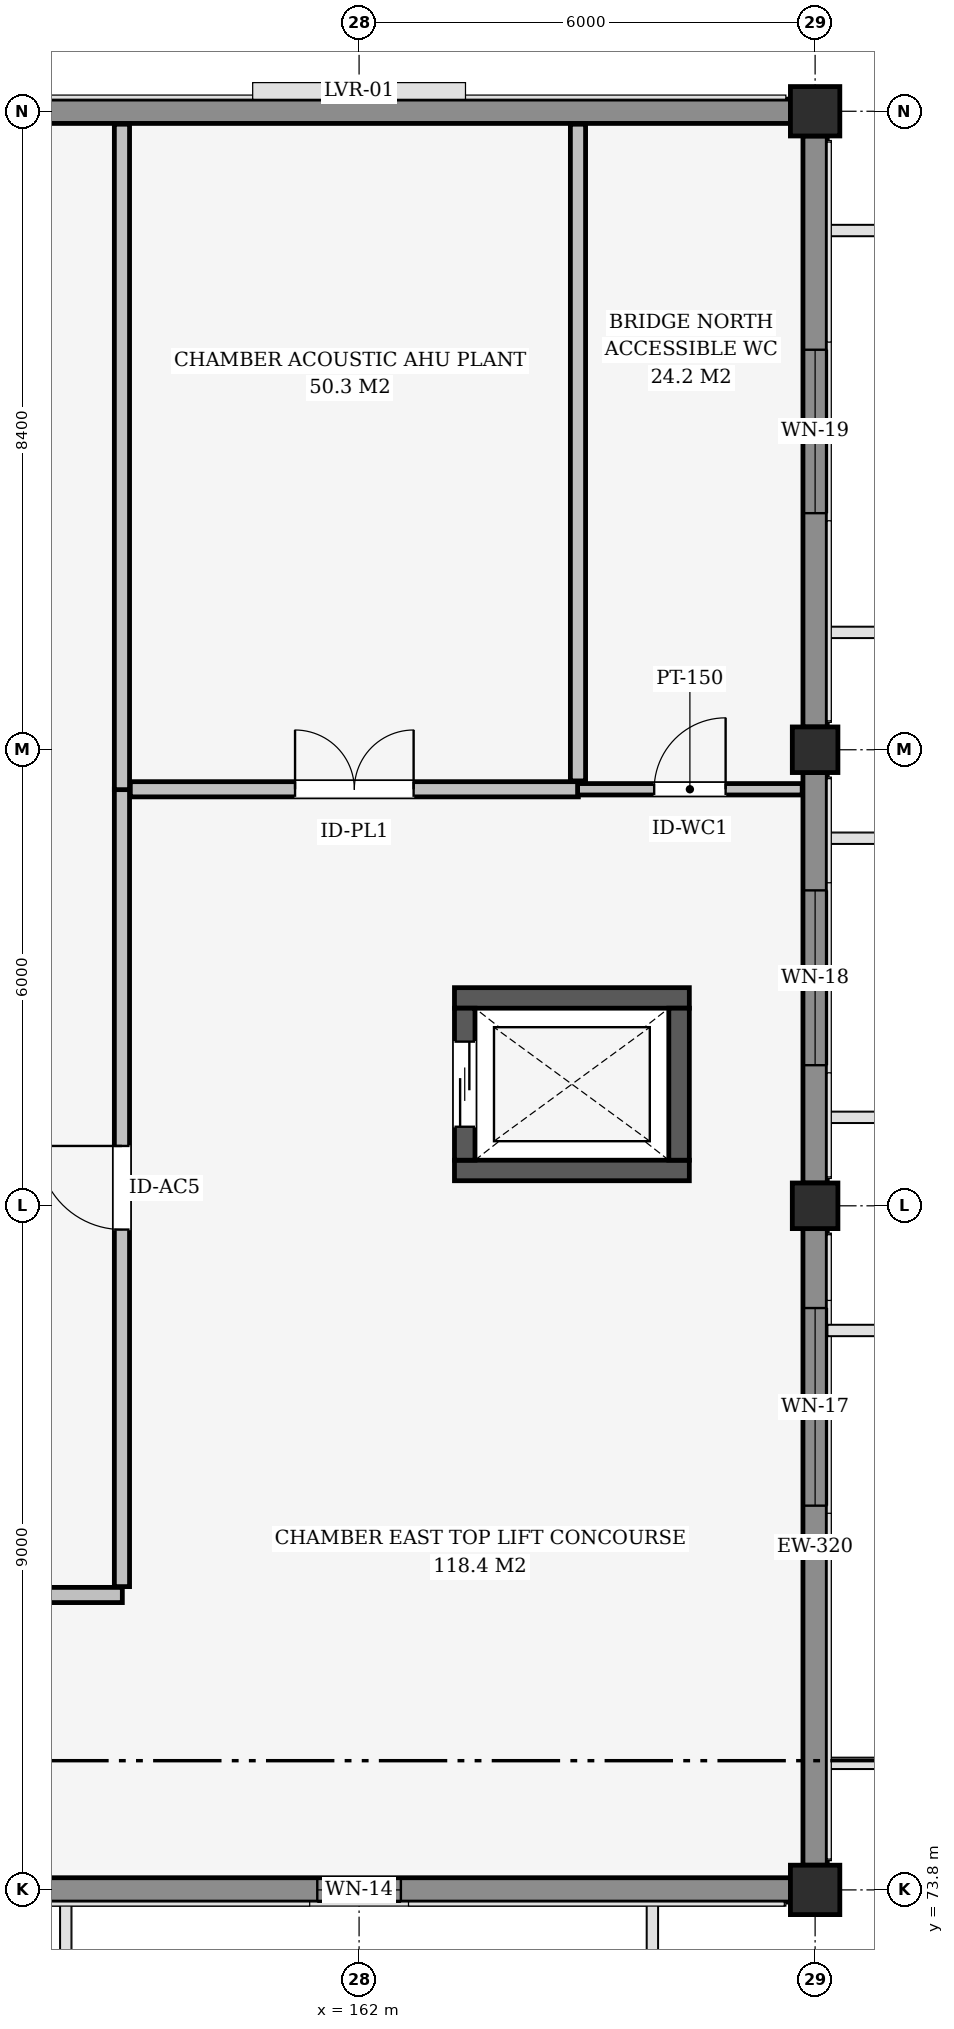
"""IFC4 building model, lengths in metres.
Left out: names, types, materials, properties, quantities, classifications, styles, units other than length and angle.
Written with IfcOpenShell. Run it as: python <this file> out.ifc"""

import sys

from ifc_helpers import new_model, si_unit, direction, frame, frame_2d, origin, origin_2d, place, context, subcontext, project, spatial, rectangle, extrude, element, fill, save


model = new_model("IFC4")
c1 = context("Model", 3, precision=1e-05, world=origin(), true_north=direction((0.0, 1.0)))
c2 = subcontext(c1, "Body", "Model", "MODEL_VIEW")
j1 = project(units=[si_unit("LENGTHUNIT", "METRE"), si_unit("PLANEANGLEUNIT", "RADIAN")], contexts=[c1])
p1 = place(None, origin())
s1 = spatial("IfcSite", under=j1, at=p1, CompositionType="ELEMENT")
p2 = place(p1, origin())
s2 = spatial("IfcBuilding", under=s1, at=p2, CompositionType="ELEMENT")
p3 = place(p2, frame((0.0, 0.0, 13.8)))
s3 = spatial("IfcBuildingStorey", under=s2, at=p3, CompositionType="ELEMENT", Elevation=13.8)
p4 = place(p3, frame((168.0, 73.8, 0.0), z_axis=(0.0, 0.0, 1.0), x_axis=(1.0, 0.0, 0.0)))
e1 = element("IfcColumn", 1, at=p4, inside=s3, PredefinedType="COLUMN", context=c2, shape_type="SweptSolid", body=[
    extrude(rectangle(XDim=0.65, YDim=0.65, at=origin_2d()), origin(), (0.0, 0.0, 1.0), 4.5),
])
for number, where, z_axis, x_axis in (
    (2, (168.0, 82.8, 0.0), (0.0, 0.0, 1.0), (1.0, 0.0, 0.0)),
    (3, (168.0, 88.8, 0.0), (0.0, 0.0, 1.0), (1.0, 0.0, 0.0)),
):
    element("IfcColumn", number, at=place(p3, frame(where, z_axis=z_axis, x_axis=x_axis)), inside=s3, PredefinedType="COLUMN", context=c2, shape_type="SweptSolid", body=[
        extrude(rectangle(XDim=0.6, YDim=0.6, at=origin_2d()), origin(), (0.0, 0.0, 1.0), 4.5),
    ])
p5 = place(p3, frame((168.0, 97.2, 0.0), z_axis=(0.0, 0.0, 1.0), x_axis=(1.0, 0.0, 0.0)))
e4 = element("IfcColumn", 4, at=p5, inside=s3, PredefinedType="COLUMN", context=c2, shape_type="SweptSolid", body=[
    extrude(rectangle(XDim=0.65, YDim=0.65, at=origin_2d()), origin(), (0.0, 0.0, 1.0), 4.5),
])
p6 = place(p3, frame((167.675, 73.8, 0.0), z_axis=(0.0, 0.0, 1.0), x_axis=(-1.0, 0.0, 0.0)))
e5 = element("IfcWall", 5, at=p6, inside=s3, PredefinedType="SOLIDWALL", context=c2, shape_type="SweptSolid", body=[
    extrude(rectangle(XDim=11.35, YDim=0.32, at=frame_2d((5.675, 0.0))), origin(), (0.0, 0.0, 1.0), 3.944),
])
p7 = place(p6, frame((5.125, 0.0, 0.6)))
e6 = element("IfcOpeningElement", 6, at=p7, cuts=e5, PredefinedType="OPENING", context=c2, shape_type="SweptSolid", body=[
    extrude(rectangle(XDim=1.1, YDim=2.4, at=frame_2d((0.55, 1.2))), frame((0.0, 0.17, 0.0), z_axis=(0.0, -1.0, 0.0), x_axis=(1.0, 0.0, 0.0)), (0.0, 0.0, 1.0), 0.34),
])
p8 = place(p3, frame((156.325, 97.2, 0.0), z_axis=(0.0, 0.0, 1.0), x_axis=(1.0, 0.0, 0.0)))
e7 = element("IfcWall", 7, at=p8, inside=s3, PredefinedType="SOLIDWALL", context=c2, shape_type="SweptSolid", body=[
    extrude(rectangle(XDim=11.35, YDim=0.32, at=frame_2d((5.675, 0.0))), origin(), (0.0, 0.0, 1.0), 3.944),
])
p9 = place(p3, frame((168.0, 82.5, 0.0), z_axis=(0.0, 0.0, 1.0), x_axis=(0.0, -1.0, 0.0)))
e8 = element("IfcWall", 8, at=p9, inside=s3, PredefinedType="SOLIDWALL", context=c2, shape_type="SweptSolid", body=[
    extrude(rectangle(XDim=8.375, YDim=0.32, at=frame_2d((4.188, 0.0))), origin(), (0.0, 0.0, 1.0), 3.869),
])
p10 = place(p9, frame((1.045, 0.0, 0.85)))
e9 = element("IfcOpeningElement", 9, at=p10, cuts=e8, PredefinedType="OPENING", context=c2, shape_type="SweptSolid", body=[
    extrude(rectangle(XDim=2.6, YDim=1.7, at=frame_2d((1.3, 0.85))), frame((0.0, 0.17, 0.0), z_axis=(0.0, -1.0, 0.0), x_axis=(1.0, 0.0, 0.0)), (0.0, 0.0, 1.0), 0.34),
])
p11 = place(p3, frame((168.0, 88.5, 0.0), z_axis=(0.0, 0.0, 1.0), x_axis=(0.0, -1.0, 0.0)))
e10 = element("IfcWall", 10, at=p11, inside=s3, PredefinedType="SOLIDWALL", context=c2, shape_type="SweptSolid", body=[
    extrude(rectangle(XDim=5.4, YDim=0.32, at=frame_2d((2.7, 0.0))), origin(), (0.0, 0.0, 1.0), 3.868),
])
p12 = place(p11, frame((1.55, 0.0, 0.85)))
e11 = element("IfcOpeningElement", 11, at=p12, cuts=e10, PredefinedType="OPENING", context=c2, shape_type="SweptSolid", body=[
    extrude(rectangle(XDim=2.3, YDim=1.6, at=frame_2d((1.15, 0.8))), frame((0.0, 0.17, 0.0), z_axis=(0.0, -1.0, 0.0), x_axis=(1.0, 0.0, 0.0)), (0.0, 0.0, 1.0), 0.34),
])
p13 = place(p3, frame((168.0, 96.875, 0.0), z_axis=(0.0, 0.0, 1.0), x_axis=(0.0, -1.0, 0.0)))
e12 = element("IfcWall", 12, at=p13, inside=s3, PredefinedType="SOLIDWALL", context=c2, shape_type="SweptSolid", body=[
    extrude(rectangle(XDim=7.775, YDim=0.32, at=frame_2d((3.887, 0.0))), origin(), (0.0, 0.0, 1.0), 3.868),
])
p14 = place(p13, frame((2.812, 0.0, 0.85)))
e13 = element("IfcOpeningElement", 13, at=p14, cuts=e12, PredefinedType="OPENING", context=c2, shape_type="SweptSolid", body=[
    extrude(rectangle(XDim=2.15, YDim=1.55, at=frame_2d((1.075, 0.775))), frame((0.0, 0.17, 0.0), z_axis=(0.0, -1.0, 0.0), x_axis=(1.0, 0.0, 0.0)), (0.0, 0.0, 1.0), 0.34),
])
for number, where, z_axis, x_axis in (
    (14, (163.255, 83.265, 0.0), (0.0, 0.0, 1.0), (1.0, 0.0, 0.0)),
    (15, (163.255, 85.535, 0.0), (0.0, 0.0, 1.0), (1.0, 0.0, 0.0)),
):
    element("IfcWall", number, at=place(p3, frame(where, z_axis=z_axis, x_axis=x_axis)), inside=s3, PredefinedType="SHEAR", context=c2, shape_type="SweptSolid", body=[
        extrude(rectangle(XDim=3.09, YDim=0.27, at=frame_2d((1.545, 0.0))), origin(), (0.0, 0.0, 1.0), 4.5),
    ])
p15 = place(p3, frame((163.39, 83.4, 0.0), z_axis=(0.0, 0.0, 1.0), x_axis=(0.0, 1.0, 0.0)))
e16 = element("IfcWall", 16, at=p15, inside=s3, PredefinedType="SHEAR", context=c2, shape_type="SweptSolid", body=[
    extrude(rectangle(XDim=2.0, YDim=0.27, at=frame_2d((1.0, 0.0))), origin(), (0.0, 0.0, 1.0), 4.5),
])
p16 = place(p15, frame((0.44, 0.0, 0.0)))
e17 = element("IfcOpeningElement", 17, at=p16, cuts=e16, PredefinedType="OPENING", context=c2, shape_type="SweptSolid", body=[
    extrude(rectangle(XDim=1.12, YDim=2.15, at=frame_2d((0.56, 1.075))), frame((0.0, 0.145, 0.0), z_axis=(0.0, -1.0, 0.0), x_axis=(1.0, 0.0, 0.0)), (0.0, 0.0, 1.0), 0.29),
])
p17 = place(p3, frame((166.21, 83.4, 0.0), z_axis=(0.0, 0.0, 1.0), x_axis=(0.0, 1.0, 0.0)))
e18 = element("IfcWall", 18, at=p17, inside=s3, PredefinedType="SHEAR", context=c2, shape_type="SweptSolid", body=[
    extrude(rectangle(XDim=2.0, YDim=0.27, at=frame_2d((1.0, 0.0))), origin(), (0.0, 0.0, 1.0), 4.5),
])
p18 = place(p3, frame((144.99, 77.68, 0.0), z_axis=(0.0, 0.0, 1.0), x_axis=(1.0, 0.0, 0.0)))
e19 = element("IfcWall", 19, at=p18, inside=s3, PredefinedType="PARTITIONING", context=c2, shape_type="SweptSolid", body=[
    extrude(rectangle(XDim=13.895, YDim=0.2, at=frame_2d((6.948, 0.0))), origin(), (0.0, 0.0, 1.0), 4.5),
])
p19 = place(p18, frame((6.397, 0.0, 0.0)))
e20 = element("IfcOpeningElement", 20, at=p19, cuts=e19, PredefinedType="OPENING", context=c2, shape_type="SweptSolid", body=[
    extrude(rectangle(XDim=1.1, YDim=2.26, at=frame_2d((0.55, 1.13))), frame((0.0, 0.11, 0.0), z_axis=(0.0, -1.0, 0.0), x_axis=(1.0, 0.0, 0.0)), (0.0, 0.0, 1.0), 0.22),
])
p20 = place(p3, frame((158.88, 77.79, 0.0), z_axis=(0.0, 0.0, 1.0), x_axis=(0.0, 1.0, 0.0)))
e21 = element("IfcWall", 21, at=p20, inside=s3, PredefinedType="PARTITIONING", context=c2, shape_type="SweptSolid", body=[
    extrude(rectangle(XDim=10.495, YDim=0.2, at=frame_2d((5.248, 0.0))), origin(), (0.0, 0.0, 1.0), 4.5),
])
p21 = place(p20, frame((4.698, 0.0, 0.0)))
e22 = element("IfcOpeningElement", 22, at=p21, cuts=e21, PredefinedType="OPENING", context=c2, shape_type="SweptSolid", body=[
    extrude(rectangle(XDim=1.1, YDim=2.26, at=frame_2d((0.55, 1.13))), frame((0.0, 0.11, 0.0), z_axis=(0.0, -1.0, 0.0), x_axis=(1.0, 0.0, 0.0)), (0.0, 0.0, 1.0), 0.22),
])
p22 = place(p3, frame((158.88, 88.275, 0.0), z_axis=(0.0, 0.0, 1.0), x_axis=(0.0, 1.0, 0.0)))
e23 = element("IfcWall", 23, at=p22, inside=s3, PredefinedType="PARTITIONING", context=c2, shape_type="SweptSolid", body=[
    extrude(rectangle(XDim=8.755, YDim=0.2, at=frame_2d((4.377, 0.0))), origin(), (0.0, 0.0, 1.0), 4.5),
])
p23 = place(p3, frame((158.99, 88.28, 0.0), z_axis=(0.0, 0.0, 1.0), x_axis=(1.0, 0.0, 0.0)))
e24 = element("IfcWall", 24, at=p23, inside=s3, PredefinedType="PARTITIONING", context=c2, shape_type="SweptSolid", body=[
    extrude(rectangle(XDim=5.895, YDim=0.2, at=frame_2d((2.948, 0.0))), origin(), (0.0, 0.0, 1.0), 3.944),
])
p24 = place(p23, frame((2.167, 0.0, 0.0)))
e25 = element("IfcOpeningElement", 25, at=p24, cuts=e24, PredefinedType="OPENING", context=c2, shape_type="SweptSolid", body=[
    extrude(rectangle(XDim=1.56, YDim=2.26, at=frame_2d((0.78, 1.13))), frame((0.0, 0.11, 0.0), z_axis=(0.0, -1.0, 0.0), x_axis=(1.0, 0.0, 0.0)), (0.0, 0.0, 1.0), 0.22),
])
p25 = place(p3, frame((164.875, 88.28, 0.0), z_axis=(0.0, 0.0, 1.0), x_axis=(1.0, 0.0, 0.0)))
e26 = element("IfcWall", 26, at=p25, inside=s3, PredefinedType="PARTITIONING", context=c2, shape_type="SweptSolid", body=[
    extrude(rectangle(XDim=2.955, YDim=0.15, at=frame_2d((1.478, 0.0))), origin(), (0.0, 0.0, 1.0), 3.944),
])
p26 = place(p25, frame((1.008, 0.0, 0.0)))
e27 = element("IfcOpeningElement", 27, at=p26, cuts=e26, PredefinedType="OPENING", context=c2, shape_type="SweptSolid", body=[
    extrude(rectangle(XDim=0.94, YDim=2.1, at=frame_2d((0.47, 1.05))), frame((0.0, 0.085, 0.0), z_axis=(0.0, -1.0, 0.0), x_axis=(1.0, 0.0, 0.0)), (0.0, 0.0, 1.0), 0.17),
])
p27 = place(p3, frame((164.88, 88.39, 0.0), z_axis=(0.0, 0.0, 1.0), x_axis=(0.0, 1.0, 0.0)))
e28 = element("IfcWall", 28, at=p27, inside=s3, PredefinedType="PARTITIONING", context=c2, shape_type="SweptSolid", body=[
    extrude(rectangle(XDim=8.64, YDim=0.2, at=frame_2d((4.32, 0.0))), origin(), (0.0, 0.0, 1.0), 4.5),
])
p28 = place(p7, origin())
e29 = element("IfcWindow", 29, at=p28, inside=s3, PartitioningType="SINGLE_PANEL", PredefinedType="WINDOW", context=c2, shape_type="SweptSolid", body=[
    extrude(rectangle(XDim=1.1, YDim=2.4, at=frame_2d((0.55, 1.2))), frame((0.0, 0.03, 0.0), z_axis=(0.0, -1.0, 0.0), x_axis=(1.0, 0.0, 0.0)), (0.0, 0.0, 1.0), 0.06),
])
fill(e6, e29)
p29 = place(p10, origin())
e30 = element("IfcWindow", 30, at=p29, inside=s3, PartitioningType="SINGLE_PANEL", PredefinedType="WINDOW", context=c2, shape_type="SweptSolid", body=[
    extrude(rectangle(XDim=2.6, YDim=1.7, at=frame_2d((1.3, 0.85))), frame((0.0, 0.03, 0.0), z_axis=(0.0, -1.0, 0.0), x_axis=(1.0, 0.0, 0.0)), (0.0, 0.0, 1.0), 0.06),
])
fill(e9, e30)
p30 = place(p12, origin())
e31 = element("IfcWindow", 31, at=p30, inside=s3, PartitioningType="SINGLE_PANEL", PredefinedType="WINDOW", context=c2, shape_type="SweptSolid", body=[
    extrude(rectangle(XDim=2.3, YDim=1.6, at=frame_2d((1.15, 0.8))), frame((0.0, 0.03, 0.0), z_axis=(0.0, -1.0, 0.0), x_axis=(1.0, 0.0, 0.0)), (0.0, 0.0, 1.0), 0.06),
])
fill(e11, e31)
p31 = place(p14, origin())
e32 = element("IfcWindow", 32, at=p31, inside=s3, PartitioningType="SINGLE_PANEL", PredefinedType="WINDOW", context=c2, shape_type="SweptSolid", body=[
    extrude(rectangle(XDim=2.15, YDim=1.55, at=frame_2d((1.075, 0.775))), frame((0.0, 0.03, 0.0), z_axis=(0.0, -1.0, 0.0), x_axis=(1.0, 0.0, 0.0)), (0.0, 0.0, 1.0), 0.06),
])
fill(e13, e32)
p32 = place(p16, origin())
e33 = element("IfcDoor", 33, at=p32, inside=s3, OperationType="SLIDING_TO_LEFT", PredefinedType="DOOR", context=c2, shape_type="SweptSolid", body=[
    extrude(rectangle(XDim=1.12, YDim=2.15, at=frame_2d((0.56, 1.075))), frame((0.0, 0.025, 0.0), z_axis=(0.0, -1.0, 0.0), x_axis=(1.0, 0.0, 0.0)), (0.0, 0.0, 1.0), 0.05),
])
fill(e17, e33)
p33 = place(p21, origin())
e34 = element("IfcDoor", 34, at=p33, inside=s3, OperationType="SINGLE_SWING_RIGHT", PredefinedType="DOOR", context=c2, shape_type="SweptSolid", body=[
    extrude(rectangle(XDim=1.1, YDim=2.26, at=frame_2d((0.55, 1.13))), frame((0.0, 0.025, 0.0), z_axis=(0.0, -1.0, 0.0), x_axis=(1.0, 0.0, 0.0)), (0.0, 0.0, 1.0), 0.05),
])
fill(e22, e34)
p34 = place(p24, origin())
e35 = element("IfcDoor", 35, at=p34, inside=s3, OperationType="DOUBLE_DOOR_SINGLE_SWING", PredefinedType="DOOR", context=c2, shape_type="SweptSolid", body=[
    extrude(rectangle(XDim=1.56, YDim=2.26, at=frame_2d((0.78, 1.13))), frame((0.0, 0.025, 0.0), z_axis=(0.0, -1.0, 0.0), x_axis=(1.0, 0.0, 0.0)), (0.0, 0.0, 1.0), 0.05),
])
fill(e25, e35)
p35 = place(p26, origin())
e36 = element("IfcDoor", 36, at=p35, inside=s3, OperationType="SINGLE_SWING_RIGHT", PredefinedType="DOOR", context=c2, shape_type="SweptSolid", body=[
    extrude(rectangle(XDim=0.94, YDim=2.1, at=frame_2d((0.47, 1.05))), frame((0.0, 0.025, 0.0), z_axis=(0.0, -1.0, 0.0), x_axis=(1.0, 0.0, 0.0)), (0.0, 0.0, 1.0), 0.05),
])
fill(e27, e36)
save(model, sys.argv[1])
